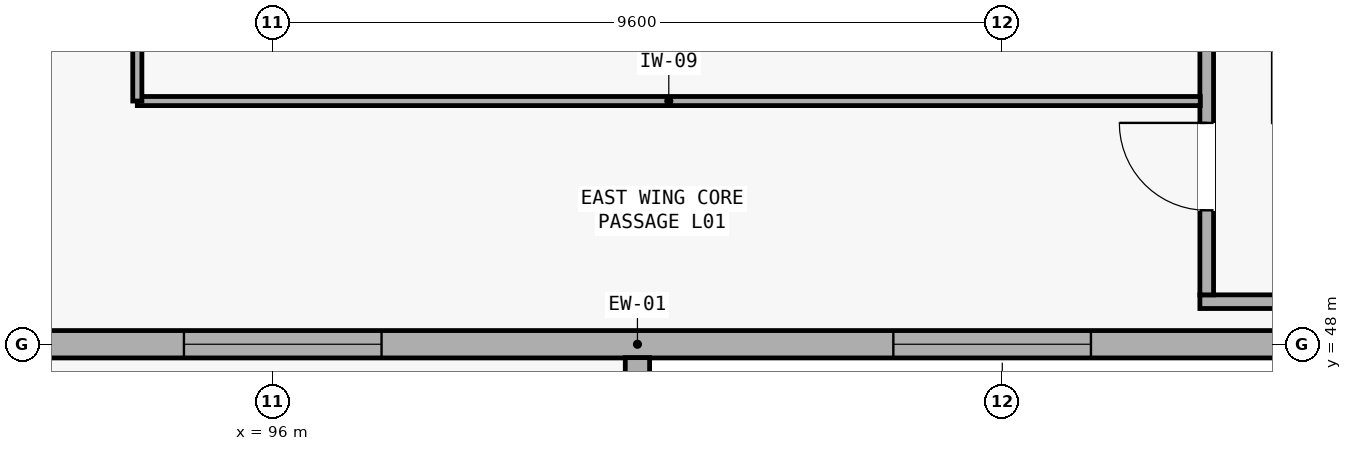
"""IFC4 building model, lengths in metres.
Left out: names, types, materials, properties, quantities, classifications, styles, units other than length and angle.
Written with IfcOpenShell. Run it as: python <this file> out.ifc"""

import sys

from ifc_helpers import new_model, si_unit, direction, frame, frame_2d, origin, place, context, subcontext, project, spatial, rectangle, extrude, element, fill, save


model = new_model("IFC4")
c1 = context("Model", 3, precision=1e-05, world=origin(), true_north=direction((0.0, 1.0)))
c2 = subcontext(c1, "Body", "Model", "MODEL_VIEW")
j1 = project(units=[si_unit("LENGTHUNIT", "METRE"), si_unit("PLANEANGLEUNIT", "RADIAN")], contexts=[c1])
p1 = place(None, origin())
s1 = spatial("IfcSite", under=j1, at=p1, CompositionType="ELEMENT")
p2 = place(p1, origin())
s2 = spatial("IfcBuilding", under=s1, at=p2, CompositionType="ELEMENT")
p3 = place(p2, frame((0.0, 0.0, 5.25)))
s3 = spatial("IfcBuildingStorey", under=s2, at=p3, CompositionType="ELEMENT", Elevation=5.25)
p4 = place(p3, frame((86.409, 48.0, 0.0), z_axis=(0.0, 0.0, 1.0), x_axis=(1.0, 0.0, 0.0)))
e1 = element("IfcWall", 1, at=p4, inside=s3, PredefinedType="SOLIDWALL", context=c2, shape_type="SweptSolid", body=[
    extrude(rectangle(XDim=28.782, YDim=0.36, at=frame_2d((14.391, 0.0))), origin(), (0.0, 0.0, 1.0), 3.14),
])
p5 = place(p4, frame((8.425, 0.0, 0.9)))
e2 = element("IfcOpeningElement", 2, at=p5, cuts=e1, PredefinedType="OPENING", context=c2, shape_type="SweptSolid", body=[
    extrude(rectangle(XDim=2.6, YDim=1.15, at=frame_2d((1.3, 0.575))), frame((0.0, 0.19, 0.0), z_axis=(0.0, -1.0, 0.0), x_axis=(1.0, 0.0, 0.0)), (0.0, 0.0, 1.0), 0.38),
])
p6 = place(p4, frame((17.758, 0.0, 0.9)))
e3 = element("IfcOpeningElement", 3, at=p6, cuts=e1, PredefinedType="OPENING", context=c2, shape_type="SweptSolid", body=[
    extrude(rectangle(XDim=2.6, YDim=1.15, at=frame_2d((1.3, 0.575))), frame((0.0, 0.19, 0.0), z_axis=(0.0, -1.0, 0.0), x_axis=(1.0, 0.0, 0.0)), (0.0, 0.0, 1.0), 0.38),
])
p7 = place(p3, frame((100.8, 46.572, 0.0), z_axis=(0.0, 0.0, 1.0), x_axis=(0.0, 1.0, 0.0)))
e4 = element("IfcWall", 4, at=p7, inside=s3, PredefinedType="SOLIDWALL", context=c2, shape_type="SweptSolid", body=[
    extrude(rectangle(XDim=1.252, YDim=0.32, at=frame_2d((0.626, 0.0))), origin(), (0.0, 0.0, 1.0), 3.9),
])
p8 = place(p3, frame((108.2, 48.56, 0.0), z_axis=(0.0, 0.0, 1.0), x_axis=(1.0, 0.0, 0.0)))
e5 = element("IfcWall", 5, at=p8, inside=s3, PredefinedType="PARTITIONING", context=c2, shape_type="SweptSolid", body=[
    extrude(rectangle(XDim=6.4, YDim=0.18, at=frame_2d((3.2, 0.0))), origin(), (0.0, 0.0, 1.0), 3.96),
])
p9 = place(p3, frame((108.29, 48.65, 0.0), z_axis=(0.0, 0.0, 1.0), x_axis=(0.0, 1.0, 0.0)))
e6 = element("IfcWall", 6, at=p9, inside=s3, PredefinedType="PARTITIONING", context=c2, shape_type="SweptSolid", body=[
    extrude(rectangle(XDim=3.375, YDim=0.18, at=frame_2d((1.688, 0.0))), origin(), (0.0, 0.0, 1.0), 3.96),
])
p10 = place(p9, frame((1.113, 0.0, 0.0)))
e7 = element("IfcOpeningElement", 7, at=p10, cuts=e6, PredefinedType="OPENING", context=c2, shape_type="SweptSolid", body=[
    extrude(rectangle(XDim=1.15, YDim=2.15, at=frame_2d((0.575, 1.075))), frame((0.0, 0.1, 0.0), z_axis=(0.0, -1.0, 0.0), x_axis=(1.0, 0.0, 0.0)), (0.0, 0.0, 1.0), 0.2),
])
p11 = place(p3, frame((94.22, 51.2, 0.0), z_axis=(0.0, 0.0, 1.0), x_axis=(1.0, 0.0, 0.0)))
e8 = element("IfcWall", 8, at=p11, inside=s3, PredefinedType="PARTITIONING", context=c2, shape_type="SweptSolid", body=[
    extrude(rectangle(XDim=13.985, YDim=0.12, at=frame_2d((6.993, 0.0))), origin(), (0.0, 0.0, 1.0), 3.49),
])
p12 = place(p3, frame((94.22, 68.0, 0.0), z_axis=(0.0, 0.0, 1.0), x_axis=(0.0, -1.0, 0.0)))
e9 = element("IfcWall", 9, at=p12, inside=s3, PredefinedType="PARTITIONING", context=c2, shape_type="SweptSolid", body=[
    extrude(rectangle(XDim=16.8, YDim=0.12, at=frame_2d((8.4, 0.0))), origin(), (0.0, 0.0, 1.0), 3.96),
])
p13 = place(p12, frame((7.91, 0.0, 0.0)))
e10 = element("IfcOpeningElement", 10, at=p13, cuts=e9, PredefinedType="OPENING", context=c2, shape_type="SweptSolid", body=[
    extrude(rectangle(XDim=0.98, YDim=2.1, at=frame_2d((0.49, 1.05))), frame((0.0, 0.07, 0.0), z_axis=(0.0, -1.0, 0.0), x_axis=(1.0, 0.0, 0.0)), (0.0, 0.0, 1.0), 0.14),
])
p14 = place(p5, origin())
e11 = element("IfcWindow", 11, at=p14, inside=s3, PartitioningType="SINGLE_PANEL", PredefinedType="WINDOW", context=c2, shape_type="SweptSolid", body=[
    extrude(rectangle(XDim=2.6, YDim=1.15, at=frame_2d((1.3, 0.575))), frame((0.0, 0.03, 0.0), z_axis=(0.0, -1.0, 0.0), x_axis=(1.0, 0.0, 0.0)), (0.0, 0.0, 1.0), 0.06),
])
fill(e2, e11)
p15 = place(p6, origin())
e12 = element("IfcWindow", 12, at=p15, inside=s3, PartitioningType="SINGLE_PANEL", PredefinedType="WINDOW", context=c2, shape_type="SweptSolid", body=[
    extrude(rectangle(XDim=2.6, YDim=1.15, at=frame_2d((1.3, 0.575))), frame((0.0, 0.03, 0.0), z_axis=(0.0, -1.0, 0.0), x_axis=(1.0, 0.0, 0.0)), (0.0, 0.0, 1.0), 0.06),
])
fill(e3, e12)
p16 = place(p10, origin())
e13 = element("IfcDoor", 13, at=p16, inside=s3, OperationType="SINGLE_SWING_RIGHT", PredefinedType="DOOR", context=c2, shape_type="SweptSolid", body=[
    extrude(rectangle(XDim=1.15, YDim=2.15, at=frame_2d((0.575, 1.075))), frame((0.0, 0.025, 0.0), z_axis=(0.0, -1.0, 0.0), x_axis=(1.0, 0.0, 0.0)), (0.0, 0.0, 1.0), 0.05),
])
fill(e7, e13)
save(model, sys.argv[1])
